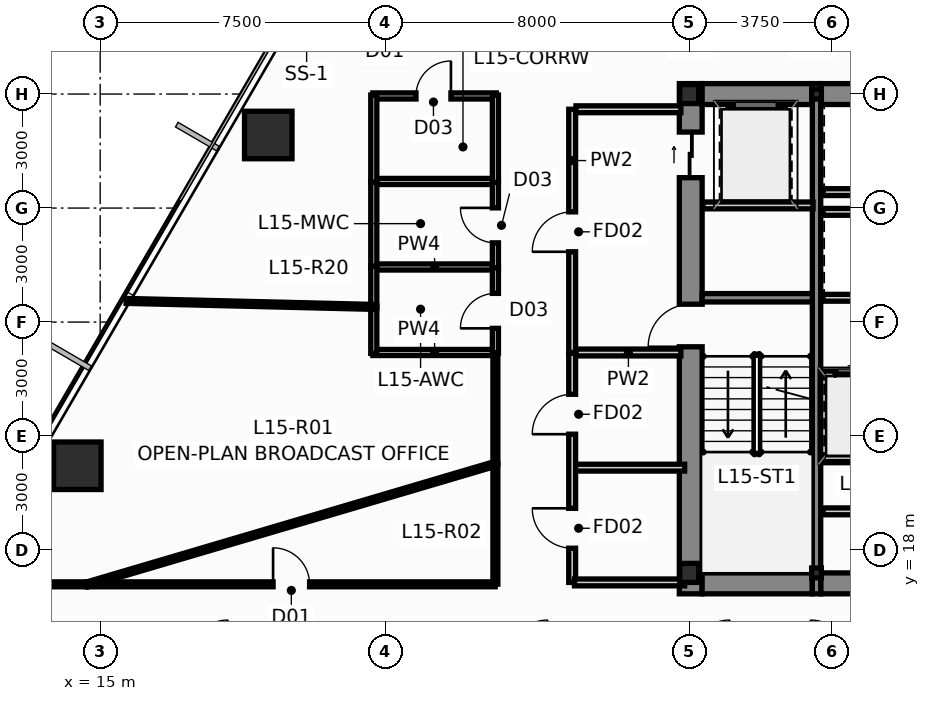
"""IFC4 building model, lengths in metres.
Left out: names, types, materials, properties, quantities, classifications, styles, units other than length and angle.
Written with IfcOpenShell. Run it as: python <this file> out.ifc"""

import sys

from ifc_helpers import new_model, si_unit, direction, frame, frame_2d, origin, origin_2d, place, context, subcontext, project, spatial, rectangle, hollow_rectangle, i_section, extrude, source, transform, mapped, element, fill, save


model = new_model("IFC4")
c1 = context("Model", 3, precision=1e-05, world=origin(), true_north=direction((0.0, 1.0)))
c2 = subcontext(c1, "Body", "Model", "MODEL_VIEW")
j1 = project(units=[si_unit("LENGTHUNIT", "METRE"), si_unit("PLANEANGLEUNIT", "RADIAN")], contexts=[c1])
p1 = place(None, origin())
s1 = spatial("IfcSite", under=j1, at=p1, CompositionType="ELEMENT")
p2 = place(p1, origin())
s2 = spatial("IfcBuilding", under=s1, at=p2, CompositionType="ELEMENT")
p3 = place(p2, frame((0.0, 0.0, 60.45)))
s3 = spatial("IfcBuildingStorey", under=s2, at=p3, CompositionType="ELEMENT", Elevation=60.45)
m1 = source(origin(), c2, "Body", "SweptSolid", [
    extrude(i_section(OverallWidth=0.5, OverallDepth=0.5, WebThickness=0.028, FlangeThickness=0.04, at=origin_2d()), origin(), (0.0, 0.0, 1.0), 3.65),
])
for number, where, z_axis, x_axis in (
    (1, (30.5, 17.4, 0.0), (0.0, 0.0, 1.0), (1.0, 0.0, 0.0)),
    (2, (30.5, 30.0, 0.0), (0.0, 0.0, 1.0), (1.0, 0.0, 0.0)),
):
    element("IfcColumn", number, at=place(p3, frame(where, z_axis=z_axis, x_axis=x_axis)), inside=s3, PredefinedType="COLUMN", context=c2, shape_type="MappedRepresentation", body=[
        mapped(m1, transform((0.0, 0.0, 0.0), scale=1.0)),
    ])
m2 = source(origin(), c2, "Body", "SweptSolid", [
    extrude(i_section(OverallWidth=0.256, OverallDepth=0.26, WebThickness=0.01, FlangeThickness=0.017, at=origin_2d()), origin(), (0.0, 0.0, 1.0), 3.65),
])
for number, where, z_axis, x_axis in (
    (3, (33.85, 17.4, 0.0), (0.0, 0.0, 1.0), (1.0, 0.0, 0.0)),
    (4, (33.85, 30.0, 0.0), (0.0, 0.0, 1.0), (1.0, 0.0, 0.0)),
):
    element("IfcColumn", number, at=place(p3, frame(where, z_axis=z_axis, x_axis=x_axis)), inside=s3, PredefinedType="COLUMN", context=c2, shape_type="MappedRepresentation", body=[
        mapped(m2, transform((0.0, 0.0, 0.0), scale=1.0)),
    ])
p4 = place(p3, frame((30.54, 16.85, 0.0), z_axis=(0.0, 0.0, 1.0), x_axis=(0.0, 1.0, 0.0)))
e5 = element("IfcWall", 5, at=p4, inside=s3, PredefinedType="SHEAR", context=c2, shape_type="SweptSolid", body=[
    extrude(rectangle(XDim=13.425, YDim=0.6, at=frame_2d((6.712, 0.0))), origin(), (0.0, 0.0, 1.0), 3.65),
])
p5 = place(p4, frame((6.5, 0.0, 0.0)))
e6 = element("IfcOpeningElement", 6, at=p5, cuts=e5, PredefinedType="OPENING", context=c2, shape_type="SweptSolid", body=[
    extrude(rectangle(XDim=1.12, YDim=2.15, at=frame_2d((0.56, 1.075))), frame((0.0, 0.312, 0.0), z_axis=(0.0, -1.0, 0.0), x_axis=(1.0, 0.0, 0.0)), (0.0, 0.0, 1.0), 0.624),
])
p6 = place(p4, frame((10.95, 0.0, 0.0)))
e7 = element("IfcOpeningElement", 7, at=p6, cuts=e5, PredefinedType="OPENING", context=c2, shape_type="SweptSolid", body=[
    extrude(rectangle(XDim=1.2, YDim=2.2, at=frame_2d((0.6, 1.1))), frame((0.0, 0.312, 0.0), z_axis=(0.0, -1.0, 0.0), x_axis=(1.0, 0.0, 0.0)), (0.0, 0.0, 1.0), 0.624),
])
p7 = place(p3, frame((30.84, 17.125, 0.0), z_axis=(0.0, 0.0, 1.0), x_axis=(1.0, 0.0, 0.0)))
e8 = element("IfcWall", 8, at=p7, inside=s3, PredefinedType="SHEAR", context=c2, shape_type="SweptSolid", body=[
    extrude(rectangle(XDim=2.9, YDim=0.55, at=frame_2d((1.45, 0.0))), origin(), (0.0, 0.0, 1.0), 3.65),
])
p8 = place(p3, frame((33.96, 17.125, 0.0), z_axis=(0.0, 0.0, 1.0), x_axis=(1.0, 0.0, 0.0)))
e9 = element("IfcWall", 9, at=p8, inside=s3, PredefinedType="SHEAR", context=c2, shape_type="SweptSolid", body=[
    extrude(rectangle(XDim=8.08, YDim=0.55, at=frame_2d((4.04, 0.0))), origin(), (0.0, 0.0, 1.0), 3.65),
])
p9 = place(p3, frame((30.84, 30.0, 0.0), z_axis=(0.0, 0.0, 1.0), x_axis=(1.0, 0.0, 0.0)))
e10 = element("IfcWall", 10, at=p9, inside=s3, PredefinedType="SHEAR", context=c2, shape_type="SweptSolid", body=[
    extrude(rectangle(XDim=2.9, YDim=0.55, at=frame_2d((1.45, 0.0))), origin(), (0.0, 0.0, 1.0), 3.65),
])
p10 = place(p3, frame((33.96, 30.0, 0.0), z_axis=(0.0, 0.0, 1.0), x_axis=(1.0, 0.0, 0.0)))
e11 = element("IfcWall", 11, at=p10, inside=s3, PredefinedType="SHEAR", context=c2, shape_type="SweptSolid", body=[
    extrude(rectangle(XDim=3.78, YDim=0.55, at=frame_2d((1.89, 0.0))), origin(), (0.0, 0.0, 1.0), 3.65),
])
p11 = place(p3, frame((33.85, 16.85, 0.0), z_axis=(0.0, 0.0, 1.0), x_axis=(0.0, 1.0, 0.0)))
e12 = element("IfcWall", 12, at=p11, inside=s3, PredefinedType="SHEAR", context=c2, shape_type="SweptSolid", body=[
    extrude(rectangle(XDim=13.425, YDim=0.22, at=frame_2d((6.712, 0.0))), origin(), (0.0, 0.0, 1.0), 3.65),
])
p12 = place(p3, frame((30.84, 24.64, 0.0), z_axis=(0.0, 0.0, 1.0), x_axis=(1.0, 0.0, 0.0)))
e13 = element("IfcWall", 13, at=p12, inside=s3, PredefinedType="SHEAR", context=c2, shape_type="SweptSolid", body=[
    extrude(rectangle(XDim=2.9, YDim=0.22, at=frame_2d((1.45, 0.0))), origin(), (0.0, 0.0, 1.0), 3.65),
])
m3 = source(origin(), c2, "Body", "SweptSolid", [
    extrude(hollow_rectangle(XDim=1.25, YDim=1.25, WallThickness=0.07, at=origin_2d()), origin(), (0.0, 0.0, 1.0), 3.651),
])
p13 = place(p3, frame((19.423, 28.923, 0.0), z_axis=(0.014912316331, -0.013775502979, 0.999793907933), x_axis=(0.678553674548, 0.734550822447, 0.0)))
e14 = element("IfcColumn", 14, at=p13, inside=s3, PredefinedType="COLUMN", context=c2, shape_type="MappedRepresentation", body=[
    mapped(m3, transform((0.0, 0.0, 0.0), scale=1.0)),
])
m4 = source(origin(), c2, "Body", "SweptSolid", [
    extrude(hollow_rectangle(XDim=1.25, YDim=1.25, WallThickness=0.07, at=origin_2d()), origin(), (0.0, 0.0, 1.0), 3.651),
])
p14 = place(p3, frame((14.398, 20.219, 0.0), z_axis=(0.010364239282, -0.021530871282, 0.999714461297), x_axis=(0.901042175273, 0.433731481886, 0.0)))
e15 = element("IfcColumn", 15, at=p14, inside=s3, PredefinedType="COLUMN", context=c2, shape_type="MappedRepresentation", body=[
    mapped(m4, transform((0.0, 0.0, 0.0), scale=1.0)),
])
p15 = place(p3, frame((18.497, 4.465, 0.0), z_axis=(0.0, 0.0, 1.0), x_axis=(-0.495984276953, 0.868331501798, 0.0)))
e16 = element("IfcWall", 16, at=p15, inside=s3, PredefinedType="STANDARD", context=c2, shape_type="SweptSolid", body=[
    extrude(rectangle(XDim=14.45, YDim=0.28, at=frame_2d((7.225, 0.0))), origin(), (0.0, 0.0, 1.0), 3.4),
])
p16 = place(p15, frame((7.68, 0.0, 0.9)))
e17 = element("IfcOpeningElement", 17, at=p16, cuts=e16, PredefinedType="OPENING", context=c2, shape_type="SweptSolid", body=[
    extrude(rectangle(XDim=1.8, YDim=1.8, at=frame_2d((0.9, 0.9))), frame((0.0, 0.152, 0.0), z_axis=(0.0, -1.0, 0.0), x_axis=(1.0, 0.0, 0.0)), (0.0, 0.0, 1.0), 0.304),
])
p17 = place(p3, frame((34.02, 22.62, 0.0), z_axis=(0.0, 0.0, 1.0), x_axis=(1.0, 0.0, 0.0)))
e18 = element("IfcWall", 18, at=p17, inside=s3, PredefinedType="PARTITIONING", context=c2, shape_type="SweptSolid", body=[
    extrude(rectangle(XDim=3.6, YDim=0.18, at=frame_2d((1.8, 0.0))), origin(), (0.0, 0.0, 1.0), 3.4),
])
p18 = place(p17, frame((0.32, 0.0, 0.0)))
e19 = element("IfcOpeningElement", 19, at=p18, cuts=e18, PredefinedType="OPENING", context=c2, shape_type="SweptSolid", body=[
    extrude(rectangle(XDim=1.1, YDim=2.2, at=frame_2d((0.55, 1.1))), frame((0.0, 0.102, 0.0), z_axis=(0.0, -1.0, 0.0), x_axis=(1.0, 0.0, 0.0)), (0.0, 0.0, 1.0), 0.204),
])
p19 = place(p17, frame((2.12, 0.0, 0.0)))
e20 = element("IfcOpeningElement", 20, at=p19, cuts=e18, PredefinedType="OPENING", context=c2, shape_type="SweptSolid", body=[
    extrude(rectangle(XDim=1.1, YDim=2.2, at=frame_2d((0.55, 1.1))), frame((0.0, 0.102, 0.0), z_axis=(0.0, -1.0, 0.0), x_axis=(1.0, 0.0, 0.0)), (0.0, 0.0, 1.0), 0.204),
])
p20 = place(p3, frame((34.02, 26.9, 0.0), z_axis=(0.0, 0.0, 1.0), x_axis=(1.0, 0.0, 0.0)))
e21 = element("IfcWall", 21, at=p20, inside=s3, PredefinedType="PARTITIONING", context=c2, shape_type="SweptSolid", body=[
    extrude(rectangle(XDim=3.6, YDim=0.18, at=frame_2d((1.8, 0.0))), origin(), (0.0, 0.0, 1.0), 3.4),
])
p21 = place(p3, frame((34.02, 24.64, 0.0), z_axis=(0.0, 0.0, 1.0), x_axis=(1.0, 0.0, 0.0)))
e22 = element("IfcWall", 22, at=p21, inside=s3, PredefinedType="PARTITIONING", context=c2, shape_type="SweptSolid", body=[
    extrude(rectangle(XDim=3.68, YDim=0.18, at=frame_2d((1.84, 0.0))), origin(), (0.0, 0.0, 1.0), 3.4),
])
p22 = place(p3, frame((34.02, 27.42, 0.0), z_axis=(0.0, 0.0, 1.0), x_axis=(1.0, 0.0, 0.0)))
e23 = element("IfcWall", 23, at=p22, inside=s3, PredefinedType="PARTITIONING", context=c2, shape_type="SweptSolid", body=[
    extrude(rectangle(XDim=3.66, YDim=0.18, at=frame_2d((1.83, 0.0))), origin(), (0.0, 0.0, 1.0), 3.4),
])
p23 = place(p3, frame((27.42, 23.2, 0.0), z_axis=(0.0, 0.0, 1.0), x_axis=(0.0, 1.0, 0.0)))
e24 = element("IfcWall", 24, at=p23, inside=s3, PredefinedType="PARTITIONING", context=c2, shape_type="SweptSolid", body=[
    extrude(rectangle(XDim=6.4, YDim=0.18, at=frame_2d((3.2, 0.0))), origin(), (0.0, 0.0, 1.0), 3.026),
])
p24 = place(p23, frame((2.65, 0.0, 0.0)))
e25 = element("IfcOpeningElement", 25, at=p24, cuts=e24, PredefinedType="OPENING", context=c2, shape_type="SweptSolid", body=[
    extrude(rectangle(XDim=1.05, YDim=2.15, at=frame_2d((0.525, 1.075))), frame((0.0, 0.102, 0.0), z_axis=(0.0, -1.0, 0.0), x_axis=(1.0, 0.0, 0.0)), (0.0, 0.0, 1.0), 0.204),
])
p25 = place(p3, frame((27.52, 23.2, 0.0), z_axis=(0.0, 0.0, 1.0), x_axis=(1.0, 0.0, 0.0)))
e26 = element("IfcWall", 26, at=p25, inside=s3, PredefinedType="PARTITIONING", context=c2, shape_type="SweptSolid", body=[
    extrude(rectangle(XDim=2.76, YDim=0.18, at=frame_2d((1.38, 0.0))), origin(), (0.0, 0.0, 1.0), 3.4),
])
p26 = place(p3, frame((27.52, 29.6, 0.0), z_axis=(0.0, 0.0, 1.0), x_axis=(1.0, 0.0, 0.0)))
e27 = element("IfcWall", 27, at=p26, inside=s3, PredefinedType="PARTITIONING", context=c2, shape_type="SweptSolid", body=[
    extrude(rectangle(XDim=2.76, YDim=0.18, at=frame_2d((1.38, 0.0))), origin(), (0.0, 0.0, 1.0), 2.783),
])
p27 = place(p3, frame((30.86, 27.07, 0.0), z_axis=(0.0, 0.0, 1.0), x_axis=(1.0, 0.0, 0.0)))
e28 = element("IfcWall", 28, at=p27, inside=s3, PredefinedType="PARTITIONING", context=c2, shape_type="SweptSolid", body=[
    extrude(rectangle(XDim=2.9, YDim=0.18, at=frame_2d((1.45, 0.0))), origin(), (0.0, 0.0, 1.0), 3.4),
])
p28 = place(p3, frame((34.02, 20.42, 0.0), z_axis=(0.0, 0.0, 1.0), x_axis=(1.0, 0.0, 0.0)))
e29 = element("IfcWall", 29, at=p28, inside=s3, PredefinedType="PARTITIONING", context=c2, shape_type="SweptSolid", body=[
    extrude(rectangle(XDim=3.64, YDim=0.18, at=frame_2d((1.82, 0.0))), origin(), (0.0, 0.0, 1.0), 3.4),
])
p29 = place(p3, frame((34.02, 19.02, 0.0), z_axis=(0.0, 0.0, 1.0), x_axis=(1.0, 0.0, 0.0)))
e30 = element("IfcWall", 30, at=p29, inside=s3, PredefinedType="PARTITIONING", context=c2, shape_type="SweptSolid", body=[
    extrude(rectangle(XDim=3.58, YDim=0.18, at=frame_2d((1.79, 0.0))), origin(), (0.0, 0.0, 1.0), 3.4),
])
p30 = place(p3, frame((27.48, 20.17, 0.0), z_axis=(0.0, 0.0, 1.0), x_axis=(1.0, 0.0, 0.0)))
e31 = element("IfcWall", 31, at=p30, inside=s3, PredefinedType="PARTITIONING", context=c2, shape_type="SweptSolid", body=[
    extrude(rectangle(XDim=2.9, YDim=0.18, at=frame_2d((1.45, 0.0))), origin(), (0.0, 0.0, 1.0), 3.4),
])
p31 = place(p3, frame((27.42, 17.15, 0.0), z_axis=(0.0, 0.0, 1.0), x_axis=(0.0, 1.0, 0.0)))
e32 = element("IfcWall", 32, at=p31, inside=s3, PredefinedType="PARTITIONING", context=c2, shape_type="SweptSolid", body=[
    extrude(rectangle(XDim=6.03, YDim=0.18, at=frame_2d((3.015, 0.0))), origin(), (0.0, 0.0, 1.0), 3.4),
])
p32 = place(p31, frame((0.9, 0.0, 0.0)))
e33 = element("IfcOpeningElement", 33, at=p32, cuts=e32, PredefinedType="OPENING", context=c2, shape_type="SweptSolid", body=[
    extrude(rectangle(XDim=1.05, YDim=2.15, at=frame_2d((0.525, 1.075))), frame((0.0, 0.102, 0.0), z_axis=(0.0, -1.0, 0.0), x_axis=(1.0, 0.0, 0.0)), (0.0, 0.0, 1.0), 0.204),
])
p33 = place(p31, frame((3.9, 0.0, 0.0)))
e34 = element("IfcOpeningElement", 34, at=p33, cuts=e32, PredefinedType="OPENING", context=c2, shape_type="SweptSolid", body=[
    extrude(rectangle(XDim=1.05, YDim=2.15, at=frame_2d((0.525, 1.075))), frame((0.0, 0.102, 0.0), z_axis=(0.0, -1.0, 0.0), x_axis=(1.0, 0.0, 0.0)), (0.0, 0.0, 1.0), 0.204),
])
p34 = place(p3, frame((27.48, 17.15, 0.0), z_axis=(0.0, 0.0, 1.0), x_axis=(1.0, 0.0, 0.0)))
e35 = element("IfcWall", 35, at=p34, inside=s3, PredefinedType="PARTITIONING", context=c2, shape_type="SweptSolid", body=[
    extrude(rectangle(XDim=2.9, YDim=0.18, at=frame_2d((1.45, 0.0))), origin(), (0.0, 0.0, 1.0), 2.783),
])
for number, where, z_axis, x_axis in (
    (36, (22.175, 23.2, 0.0), (0.0, 0.0, 1.0), (1.0, 0.0, 0.0)),
    (37, (22.175, 25.45, 0.0), (0.0, 0.0, 1.0), (1.0, 0.0, 0.0)),
    (38, (22.175, 27.7, 0.0), (0.0, 0.0, 1.0), (1.0, 0.0, 0.0)),
):
    element("IfcWall", number, at=place(p3, frame(where, z_axis=z_axis, x_axis=x_axis)), inside=s3, PredefinedType="PLUMBINGWALL", context=c2, shape_type="SweptSolid", body=[
        extrude(rectangle(XDim=3.25, YDim=0.16, at=frame_2d((1.625, 0.0))), origin(), (0.0, 0.0, 1.0), 3.4),
    ])
p35 = place(p3, frame((22.175, 29.95, 0.0), z_axis=(0.0, 0.0, 1.0), x_axis=(1.0, 0.0, 0.0)))
e39 = element("IfcWall", 39, at=p35, inside=s3, PredefinedType="PLUMBINGWALL", context=c2, shape_type="SweptSolid", body=[
    extrude(rectangle(XDim=3.25, YDim=0.16, at=frame_2d((1.625, 0.0))), origin(), (0.0, 0.0, 1.0), 2.783),
])
p36 = place(p35, frame((1.135, 0.0, 0.0)))
e40 = element("IfcOpeningElement", 40, at=p36, cuts=e39, PredefinedType="OPENING", context=c2, shape_type="SweptSolid", body=[
    extrude(rectangle(XDim=0.92, YDim=2.1, at=frame_2d((0.46, 1.05))), frame((0.0, 0.092, 0.0), z_axis=(0.0, -1.0, 0.0), x_axis=(1.0, 0.0, 0.0)), (0.0, 0.0, 1.0), 0.184),
])
p37 = place(p3, frame((25.4, 23.175, 0.0), z_axis=(0.0, 0.0, 1.0), x_axis=(0.0, 1.0, 0.0)))
e41 = element("IfcWall", 41, at=p37, inside=s3, PredefinedType="PLUMBINGWALL", context=c2, shape_type="SweptSolid", body=[
    extrude(rectangle(XDim=2.3, YDim=0.16, at=frame_2d((1.15, 0.0))), origin(), (0.0, 0.0, 1.0), 3.026),
])
p38 = place(p37, frame((0.66, 0.0, 0.0)))
e42 = element("IfcOpeningElement", 42, at=p38, cuts=e41, PredefinedType="OPENING", context=c2, shape_type="SweptSolid", body=[
    extrude(rectangle(XDim=0.92, YDim=2.1, at=frame_2d((0.46, 1.05))), frame((0.0, 0.092, 0.0), z_axis=(0.0, -1.0, 0.0), x_axis=(1.0, 0.0, 0.0)), (0.0, 0.0, 1.0), 0.184),
])
p39 = place(p3, frame((25.4, 25.425, 0.0), z_axis=(0.0, 0.0, 1.0), x_axis=(0.0, 1.0, 0.0)))
e43 = element("IfcWall", 43, at=p39, inside=s3, PredefinedType="PLUMBINGWALL", context=c2, shape_type="SweptSolid", body=[
    extrude(rectangle(XDim=2.3, YDim=0.16, at=frame_2d((1.15, 0.0))), origin(), (0.0, 0.0, 1.0), 3.026),
])
p40 = place(p39, frame((0.66, 0.0, 0.0)))
e44 = element("IfcOpeningElement", 44, at=p40, cuts=e43, PredefinedType="OPENING", context=c2, shape_type="SweptSolid", body=[
    extrude(rectangle(XDim=0.92, YDim=2.1, at=frame_2d((0.46, 1.05))), frame((0.0, 0.092, 0.0), z_axis=(0.0, -1.0, 0.0), x_axis=(1.0, 0.0, 0.0)), (0.0, 0.0, 1.0), 0.184),
])
for number, where, z_axis, x_axis in (
    (45, (25.4, 27.675, 0.0), (0.0, 0.0, 1.0), (0.0, 1.0, 0.0)),
    (46, (22.2, 25.425, 0.0), (0.0, 0.0, 1.0), (0.0, 1.0, 0.0)),
    (47, (22.2, 27.675, 0.0), (0.0, 0.0, 1.0), (0.0, 1.0, 0.0)),
):
    element("IfcWall", number, at=place(p3, frame(where, z_axis=z_axis, x_axis=x_axis)), inside=s3, PredefinedType="PLUMBINGWALL", context=c2, shape_type="SweptSolid", body=[
        extrude(rectangle(XDim=2.3, YDim=0.16, at=frame_2d((1.15, 0.0))), origin(), (0.0, 0.0, 1.0), 3.026),
    ])
p41 = place(p3, frame((22.2, 24.425, 0.0), z_axis=(0.0, 0.0, 1.0), x_axis=(0.0, -1.0, 0.0)))
e48 = element("IfcWall", 48, at=p41, inside=s3, PredefinedType="PLUMBINGWALL", context=c2, shape_type="SweptSolid", body=[
    extrude(rectangle(XDim=1.25, YDim=0.16, at=frame_2d((0.625, 0.0))), origin(), (0.0, 0.0, 1.0), 3.026),
])
p42 = place(p3, frame((22.2, 24.375, 0.0), z_axis=(0.0, 0.0, 1.0), x_axis=(0.0, 1.0, 0.0)))
e49 = element("IfcWall", 49, at=p42, inside=s3, PredefinedType="PLUMBINGWALL", context=c2, shape_type="SweptSolid", body=[
    extrude(rectangle(XDim=1.1, YDim=0.16, at=frame_2d((0.55, 0.0))), origin(), (0.0, 0.0, 1.0), 3.4),
])
p43 = place(p3, frame((14.665, 17.101, 0.0), z_axis=(0.0, 0.0, 1.0), x_axis=(0.959072405606, 0.283160945055, 0.0)))
e50 = element("IfcWall", 50, at=p43, inside=s3, PredefinedType="PARTITIONING", context=c2, shape_type="SweptSolid", body=[
    extrude(rectangle(XDim=11.188, YDim=0.13, at=frame_2d((5.594, 0.0))), origin(), (0.0, 0.0, 1.0), 3.4),
])
p44 = place(p3, frame((14.665, 17.1, 0.0), z_axis=(0.0, 0.0, 1.0), x_axis=(1.0, 0.0, 0.0)))
e51 = element("IfcWall", 51, at=p44, inside=s3, PredefinedType="PARTITIONING", context=c2, shape_type="SweptSolid", body=[
    extrude(rectangle(XDim=10.73, YDim=0.13, at=frame_2d((5.365, 0.0))), origin(), (0.0, 0.0, 1.0), 3.4),
])
p45 = place(p44, frame((4.885, 0.0, 0.0)))
e52 = element("IfcOpeningElement", 52, at=p45, cuts=e51, PredefinedType="OPENING", context=c2, shape_type="SweptSolid", body=[
    extrude(rectangle(XDim=0.96, YDim=2.15, at=frame_2d((0.48, 1.075))), frame((0.0, 0.077, 0.0), z_axis=(0.0, -1.0, 0.0), x_axis=(1.0, 0.0, 0.0)), (0.0, 0.0, 1.0), 0.154),
])
p46 = place(p3, frame((15.684, 24.558, 0.0), z_axis=(0.0, 0.0, 1.0), x_axis=(0.999706799028, -0.024213962438, 0.0)))
e53 = element("IfcWall", 53, at=p46, inside=s3, PredefinedType="PARTITIONING", context=c2, shape_type="SweptSolid", body=[
    extrude(rectangle(XDim=6.513, YDim=0.13, at=frame_2d((3.257, 0.0))), origin(), (0.0, 0.0, 1.0), 3.4),
])
p47 = place(p3, frame((11.345, 17.1, 0.0), z_axis=(0.0, 0.0, 1.0), x_axis=(1.0, 0.0, 0.0)))
e54 = element("IfcWall", 54, at=p47, inside=s3, PredefinedType="PARTITIONING", context=c2, shape_type="SweptSolid", body=[
    extrude(rectangle(XDim=3.31, YDim=0.13, at=frame_2d((1.655, 0.0))), origin(), (0.0, 0.0, 1.0), 3.4),
])
p48 = place(p47, frame((1.232, 0.0, 0.0)))
e55 = element("IfcOpeningElement", 55, at=p48, cuts=e54, PredefinedType="OPENING", context=c2, shape_type="SweptSolid", body=[
    extrude(rectangle(XDim=0.96, YDim=2.15, at=frame_2d((0.48, 1.075))), frame((0.0, 0.077, 0.0), z_axis=(0.0, -1.0, 0.0), x_axis=(1.0, 0.0, 0.0)), (0.0, 0.0, 1.0), 0.154),
])
p49 = place(p3, frame((25.4, 17.105, 0.0), z_axis=(0.0, 0.0, 1.0), x_axis=(0.0, 1.0, 0.0)))
e56 = element("IfcWall", 56, at=p49, inside=s3, PredefinedType="PARTITIONING", context=c2, shape_type="SweptSolid", body=[
    extrude(rectangle(XDim=3.16, YDim=0.13, at=frame_2d((1.58, 0.0))), origin(), (0.0, 0.0, 1.0), 3.4),
])
p50 = place(p3, frame((25.4, 20.275, 0.0), z_axis=(0.0, 0.0, 1.0), x_axis=(0.0, 1.0, 0.0)))
e57 = element("IfcWall", 57, at=p50, inside=s3, PredefinedType="PARTITIONING", context=c2, shape_type="SweptSolid", body=[
    extrude(rectangle(XDim=2.92, YDim=0.13, at=frame_2d((1.46, 0.0))), origin(), (0.0, 0.0, 1.0), 3.4),
])
p51 = place(p5, origin())
e58 = element("IfcDoor", 58, at=p51, inside=s3, OperationType="SINGLE_SWING_LEFT", PredefinedType="DOOR", context=c2, shape_type="SweptSolid", body=[
    extrude(rectangle(XDim=1.12, YDim=2.15, at=frame_2d((0.56, 1.075))), frame((0.0, 0.025, 0.0), z_axis=(0.0, -1.0, 0.0), x_axis=(1.0, 0.0, 0.0)), (0.0, 0.0, 1.0), 0.05),
])
fill(e6, e58)
p52 = place(p6, origin())
e59 = element("IfcDoor", 59, at=p52, inside=s3, OperationType="SLIDING_TO_LEFT", PredefinedType="DOOR", context=c2, shape_type="SweptSolid", body=[
    extrude(rectangle(XDim=1.2, YDim=2.2, at=frame_2d((0.6, 1.1))), frame((0.0, 0.025, 0.0), z_axis=(0.0, -1.0, 0.0), x_axis=(1.0, 0.0, 0.0)), (0.0, 0.0, 1.0), 0.05),
])
fill(e7, e59)
p53 = place(p18, origin())
e60 = element("IfcDoor", 60, at=p53, inside=s3, OperationType="SLIDING_TO_LEFT", PredefinedType="DOOR", context=c2, shape_type="SweptSolid", body=[
    extrude(rectangle(XDim=1.1, YDim=2.2, at=frame_2d((0.55, 1.1))), frame((0.0, 0.025, 0.0), z_axis=(0.0, -1.0, 0.0), x_axis=(1.0, 0.0, 0.0)), (0.0, 0.0, 1.0), 0.05),
])
fill(e19, e60)
p54 = place(p24, origin())
e61 = element("IfcDoor", 61, at=p54, inside=s3, OperationType="SINGLE_SWING_LEFT", PredefinedType="DOOR", context=c2, shape_type="SweptSolid", body=[
    extrude(rectangle(XDim=1.05, YDim=2.15, at=frame_2d((0.525, 1.075))), frame((0.0, 0.025, 0.0), z_axis=(0.0, -1.0, 0.0), x_axis=(1.0, 0.0, 0.0)), (0.0, 0.0, 1.0), 0.05),
])
fill(e25, e61)
p55 = place(p32, origin())
e62 = element("IfcDoor", 62, at=p55, inside=s3, OperationType="SINGLE_SWING_RIGHT", PredefinedType="DOOR", context=c2, shape_type="SweptSolid", body=[
    extrude(rectangle(XDim=1.05, YDim=2.15, at=frame_2d((0.525, 1.075))), frame((0.0, 0.025, 0.0), z_axis=(0.0, -1.0, 0.0), x_axis=(1.0, 0.0, 0.0)), (0.0, 0.0, 1.0), 0.05),
])
fill(e33, e62)
p56 = place(p33, origin())
e63 = element("IfcDoor", 63, at=p56, inside=s3, OperationType="SINGLE_SWING_LEFT", PredefinedType="DOOR", context=c2, shape_type="SweptSolid", body=[
    extrude(rectangle(XDim=1.05, YDim=2.15, at=frame_2d((0.525, 1.075))), frame((0.0, 0.025, 0.0), z_axis=(0.0, -1.0, 0.0), x_axis=(1.0, 0.0, 0.0)), (0.0, 0.0, 1.0), 0.05),
])
fill(e34, e63)
p57 = place(p36, origin())
e64 = element("IfcDoor", 64, at=p57, inside=s3, OperationType="SINGLE_SWING_RIGHT", PredefinedType="DOOR", context=c2, shape_type="SweptSolid", body=[
    extrude(rectangle(XDim=0.92, YDim=2.1, at=frame_2d((0.46, 1.05))), frame((0.0, 0.025, 0.0), z_axis=(0.0, -1.0, 0.0), x_axis=(1.0, 0.0, 0.0)), (0.0, 0.0, 1.0), 0.05),
])
fill(e40, e64)
p58 = place(p38, origin())
e65 = element("IfcDoor", 65, at=p58, inside=s3, OperationType="SINGLE_SWING_LEFT", PredefinedType="DOOR", context=c2, shape_type="SweptSolid", body=[
    extrude(rectangle(XDim=0.92, YDim=2.1, at=frame_2d((0.46, 1.05))), frame((0.0, 0.025, 0.0), z_axis=(0.0, -1.0, 0.0), x_axis=(1.0, 0.0, 0.0)), (0.0, 0.0, 1.0), 0.05),
])
fill(e42, e65)
p59 = place(p40, origin())
e66 = element("IfcDoor", 66, at=p59, inside=s3, OperationType="SINGLE_SWING_RIGHT", PredefinedType="DOOR", context=c2, shape_type="SweptSolid", body=[
    extrude(rectangle(XDim=0.92, YDim=2.1, at=frame_2d((0.46, 1.05))), frame((0.0, 0.025, 0.0), z_axis=(0.0, -1.0, 0.0), x_axis=(1.0, 0.0, 0.0)), (0.0, 0.0, 1.0), 0.05),
])
fill(e44, e66)
p60 = place(p45, origin())
e67 = element("IfcDoor", 67, at=p60, inside=s3, OperationType="SINGLE_SWING_LEFT", PredefinedType="DOOR", context=c2, shape_type="SweptSolid", body=[
    extrude(rectangle(XDim=0.96, YDim=2.15, at=frame_2d((0.48, 1.075))), frame((0.0, 0.025, 0.0), z_axis=(0.0, -1.0, 0.0), x_axis=(1.0, 0.0, 0.0)), (0.0, 0.0, 1.0), 0.05),
])
fill(e52, e67)
save(model, sys.argv[1])
